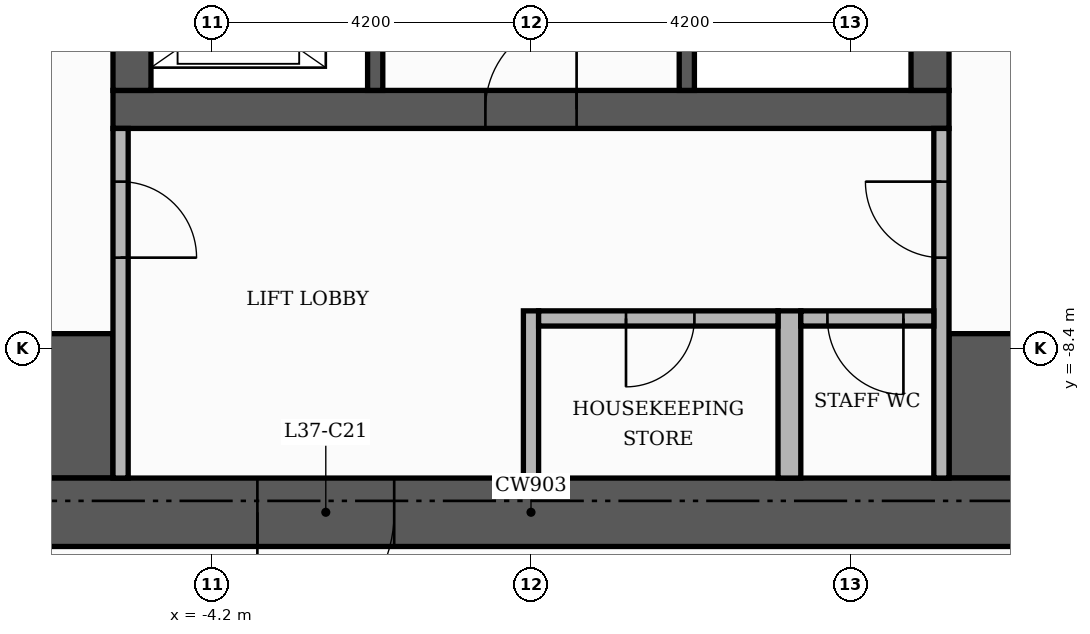
"""IFC4 building model, lengths in metres.
Left out: names, types, materials, properties, quantities, classifications, styles, units other than length and angle.
Written with IfcOpenShell. Run it as: python <this file> out.ifc"""

import sys

from ifc_helpers import new_model, si_unit, direction, frame, frame_2d, origin, place, context, subcontext, project, spatial, rectangle, extrude, element, fill, save


model = new_model("IFC4")
c1 = context("Model", 3, precision=1e-05, world=origin(), true_north=direction((0.0, 1.0)))
c2 = subcontext(c1, "Body", "Model", "MODEL_VIEW")
j1 = project(units=[si_unit("LENGTHUNIT", "METRE"), si_unit("PLANEANGLEUNIT", "RADIAN")], contexts=[c1])
p1 = place(None, origin())
s1 = spatial("IfcSite", under=j1, at=p1, CompositionType="ELEMENT")
p2 = place(p1, origin())
s2 = spatial("IfcBuilding", under=s1, at=p2, CompositionType="ELEMENT")
p3 = place(p2, frame((0.0, 0.0, 157.2)))
s3 = spatial("IfcBuildingStorey", under=s2, at=p3, CompositionType="ELEMENT", Elevation=157.2)
p4 = place(p3, frame((-5.5, -5.25, 0.0), z_axis=(0.0, 0.0, 1.0), x_axis=(1.0, 0.0, 0.0)))
e1 = element("IfcWall", 1, at=p4, inside=s3, PredefinedType="SHEAR", context=c2, shape_type="SweptSolid", body=[
    extrude(rectangle(XDim=11.0, YDim=0.5, at=frame_2d((5.5, 0.0))), origin(), (0.0, 0.0, 1.0), 3.48),
])
p5 = place(p4, frame((4.9, 0.0, 0.0)))
e2 = element("IfcOpeningElement", 2, at=p5, cuts=e1, PredefinedType="OPENING", context=c2, shape_type="SweptSolid", body=[
    extrude(rectangle(XDim=1.2, YDim=2.1, at=frame_2d((0.6, 1.05))), frame((0.0, 0.26, 0.0), z_axis=(0.0, -1.0, 0.0), x_axis=(1.0, 0.0, 0.0)), (0.0, 0.0, 1.0), 0.52),
])
for number, where, z_axis, x_axis in (
    (3, (-5.25, -5.0, 0.0), (0.0, 0.0, 1.0), (0.0, 1.0, 0.0)),
    (4, (5.25, -5.0, 0.0), (0.0, 0.0, 1.0), (0.0, 1.0, 0.0)),
):
    element("IfcWall", number, at=place(p3, frame(where, z_axis=z_axis, x_axis=x_axis)), inside=s3, PredefinedType="SHEAR", context=c2, shape_type="SweptSolid", body=[
        extrude(rectangle(XDim=10.5, YDim=0.5, at=frame_2d((5.25, 0.0))), origin(), (0.0, 0.0, 1.0), 3.48),
    ])
for number, where, z_axis, x_axis in (
    (5, (-10.1, -9.15, 0.0), (0.0, 0.0, 1.0), (1.0, 0.0, 0.0)),
    (6, (5.5, -9.15, 0.0), (0.0, 0.0, 1.0), (1.0, 0.0, 0.0)),
):
    element("IfcWall", number, at=place(p3, frame(where, z_axis=z_axis, x_axis=x_axis)), inside=s3, PredefinedType="SHEAR", context=c2, shape_type="SweptSolid", body=[
        extrude(rectangle(XDim=4.6, YDim=1.9, at=frame_2d((2.3, 0.0))), origin(), (0.0, 0.0, 1.0), 3.48),
    ])
p6 = place(p3, frame((2.05, -5.0, 0.0), z_axis=(0.0, 0.0, 1.0), x_axis=(0.0, 1.0, 0.0)))
e7 = element("IfcWall", 7, at=p6, inside=s3, PredefinedType="SHEAR", context=c2, shape_type="SweptSolid", body=[
    extrude(rectangle(XDim=6.6, YDim=0.2, at=frame_2d((3.3, 0.0))), origin(), (0.0, 0.0, 1.0), 3.48),
])
p7 = place(p6, frame((5.25, 0.0, 0.0)))
e8 = element("IfcOpeningElement", 8, at=p7, cuts=e7, PredefinedType="OPENING", context=c2, shape_type="SweptSolid", body=[
    extrude(rectangle(XDim=1.0, YDim=2.1, at=frame_2d((0.5, 1.05))), frame((0.0, 0.11, 0.0), z_axis=(0.0, -1.0, 0.0), x_axis=(1.0, 0.0, 0.0)), (0.0, 0.0, 1.0), 0.22),
])
p8 = place(p3, frame((-2.05, -5.0, 0.0), z_axis=(0.0, 0.0, 1.0), x_axis=(0.0, 1.0, 0.0)))
e9 = element("IfcWall", 9, at=p8, inside=s3, PredefinedType="SHEAR", context=c2, shape_type="SweptSolid", body=[
    extrude(rectangle(XDim=3.4, YDim=0.2, at=frame_2d((1.7, 0.0))), origin(), (0.0, 0.0, 1.0), 3.48),
])
p9 = place(p8, frame((0.55, 0.0, 0.0)))
e10 = element("IfcOpeningElement", 10, at=p9, cuts=e9, PredefinedType="OPENING", context=c2, shape_type="SweptSolid", body=[
    extrude(rectangle(XDim=1.1, YDim=2.1, at=frame_2d((0.55, 1.05))), frame((0.0, 0.11, 0.0), z_axis=(0.0, -1.0, 0.0), x_axis=(1.0, 0.0, 0.0)), (0.0, 0.0, 1.0), 0.22),
])
p10 = place(p8, frame((2.45, 0.0, 0.0)))
e11 = element("IfcOpeningElement", 11, at=p10, cuts=e9, PredefinedType="OPENING", context=c2, shape_type="SweptSolid", body=[
    extrude(rectangle(XDim=0.8, YDim=2.1, at=frame_2d((0.4, 1.05))), frame((0.0, 0.11, 0.0), z_axis=(0.0, -1.0, 0.0), x_axis=(1.0, 0.0, 0.0)), (0.0, 0.0, 1.0), 0.22),
])
p11 = place(p3, frame((-11.0, -10.55, 0.0), z_axis=(0.0, 0.0, 1.0), x_axis=(1.0, 0.0, 0.0)))
e12 = element("IfcWall", 12, at=p11, inside=s3, PredefinedType="SHEAR", context=c2, shape_type="SweptSolid", body=[
    extrude(rectangle(XDim=22.0, YDim=0.9, at=frame_2d((11.0, 0.0))), origin(), (0.0, 0.0, 1.0), 3.48),
])
p12 = place(p11, frame((7.4, 0.0, 0.0)))
e13 = element("IfcOpeningElement", 13, at=p12, cuts=e12, PredefinedType="OPENING", context=c2, shape_type="SweptSolid", body=[
    extrude(rectangle(XDim=1.8, YDim=2.2, at=frame_2d((0.9, 1.1))), frame((0.0, 0.46, 0.0), z_axis=(0.0, -1.0, 0.0), x_axis=(1.0, 0.0, 0.0)), (0.0, 0.0, 1.0), 0.92),
])
p13 = place(p3, frame((-5.4, -10.1, 0.0), z_axis=(0.0, 0.0, 1.0), x_axis=(0.0, 1.0, 0.0)))
e14 = element("IfcWall", 14, at=p13, inside=s3, PredefinedType="PARTITIONING", context=c2, shape_type="SweptSolid", body=[
    extrude(rectangle(XDim=4.6, YDim=0.2, at=frame_2d((2.3, 0.0))), origin(), (0.0, 0.0, 1.0), 3.48),
])
p14 = place(p13, frame((2.9, 0.0, 0.0)))
e15 = element("IfcOpeningElement", 15, at=p14, cuts=e14, PredefinedType="OPENING", context=c2, shape_type="SweptSolid", body=[
    extrude(rectangle(XDim=1.0, YDim=2.1, at=frame_2d((0.5, 1.05))), frame((0.0, 0.11, 0.0), z_axis=(0.0, -1.0, 0.0), x_axis=(1.0, 0.0, 0.0)), (0.0, 0.0, 1.0), 0.22),
])
p15 = place(p3, frame((0.0, -10.1, 0.0), z_axis=(0.0, 0.0, 1.0), x_axis=(0.0, 1.0, 0.0)))
e16 = element("IfcWall", 16, at=p15, inside=s3, PredefinedType="PARTITIONING", context=c2, shape_type="SweptSolid", body=[
    extrude(rectangle(XDim=2.2, YDim=0.2, at=frame_2d((1.1, 0.0))), origin(), (0.0, 0.0, 1.0), 3.48),
])
p16 = place(p3, frame((3.4, -10.1, 0.0), z_axis=(0.0, 0.0, 1.0), x_axis=(0.0, 1.0, 0.0)))
e17 = element("IfcWall", 17, at=p16, inside=s3, PredefinedType="PARTITIONING", context=c2, shape_type="SweptSolid", body=[
    extrude(rectangle(XDim=2.2, YDim=0.3, at=frame_2d((1.1, 0.0))), origin(), (0.0, 0.0, 1.0), 3.48),
])
p17 = place(p3, frame((5.4, -10.1, 0.0), z_axis=(0.0, 0.0, 1.0), x_axis=(0.0, 1.0, 0.0)))
e18 = element("IfcWall", 18, at=p17, inside=s3, PredefinedType="PARTITIONING", context=c2, shape_type="SweptSolid", body=[
    extrude(rectangle(XDim=4.6, YDim=0.2, at=frame_2d((2.3, 0.0))), origin(), (0.0, 0.0, 1.0), 3.48),
])
p18 = place(p17, frame((2.9, 0.0, 0.0)))
e19 = element("IfcOpeningElement", 19, at=p18, cuts=e18, PredefinedType="OPENING", context=c2, shape_type="SweptSolid", body=[
    extrude(rectangle(XDim=1.0, YDim=2.1, at=frame_2d((0.5, 1.05))), frame((0.0, 0.11, 0.0), z_axis=(0.0, -1.0, 0.0), x_axis=(1.0, 0.0, 0.0)), (0.0, 0.0, 1.0), 0.22),
])
p19 = place(p3, frame((0.1, -8.0, 0.0), z_axis=(0.0, 0.0, 1.0), x_axis=(1.0, 0.0, 0.0)))
e20 = element("IfcWall", 20, at=p19, inside=s3, PredefinedType="PARTITIONING", context=c2, shape_type="SweptSolid", body=[
    extrude(rectangle(XDim=3.15, YDim=0.2, at=frame_2d((1.575, 0.0))), origin(), (0.0, 0.0, 1.0), 3.48),
])
p20 = place(p19, frame((1.15, 0.0, 0.0)))
e21 = element("IfcOpeningElement", 21, at=p20, cuts=e20, PredefinedType="OPENING", context=c2, shape_type="SweptSolid", body=[
    extrude(rectangle(XDim=0.9, YDim=2.1, at=frame_2d((0.45, 1.05))), frame((0.0, 0.11, 0.0), z_axis=(0.0, -1.0, 0.0), x_axis=(1.0, 0.0, 0.0)), (0.0, 0.0, 1.0), 0.22),
])
p21 = place(p3, frame((3.55, -8.0, 0.0), z_axis=(0.0, 0.0, 1.0), x_axis=(1.0, 0.0, 0.0)))
e22 = element("IfcWall", 22, at=p21, inside=s3, PredefinedType="PARTITIONING", context=c2, shape_type="SweptSolid", body=[
    extrude(rectangle(XDim=1.75, YDim=0.2, at=frame_2d((0.875, 0.0))), origin(), (0.0, 0.0, 1.0), 3.48),
])
p22 = place(p21, frame((0.35, 0.0, 0.0)))
e23 = element("IfcOpeningElement", 23, at=p22, cuts=e22, PredefinedType="OPENING", context=c2, shape_type="SweptSolid", body=[
    extrude(rectangle(XDim=1.0, YDim=2.1, at=frame_2d((0.5, 1.05))), frame((0.0, 0.11, 0.0), z_axis=(0.0, -1.0, 0.0), x_axis=(1.0, 0.0, 0.0)), (0.0, 0.0, 1.0), 0.22),
])
p23 = place(p5, origin())
e24 = element("IfcDoor", 24, at=p23, inside=s3, OperationType="SINGLE_SWING_RIGHT", PredefinedType="DOOR", context=c2, shape_type="SweptSolid", body=[
    extrude(rectangle(XDim=1.2, YDim=2.1, at=frame_2d((0.6, 1.05))), frame((0.0, 0.025, 0.0), z_axis=(0.0, -1.0, 0.0), x_axis=(1.0, 0.0, 0.0)), (0.0, 0.0, 1.0), 0.05),
])
fill(e2, e24)
p24 = place(p14, frame((1.0, 0.0, 0.0), z_axis=(0.0, 0.0, 1.0), x_axis=(-1.0, 0.0, 0.0)))
e25 = element("IfcDoor", 25, at=p24, inside=s3, OperationType="SINGLE_SWING_LEFT", PredefinedType="DOOR", context=c2, shape_type="SweptSolid", body=[
    extrude(rectangle(XDim=1.0, YDim=2.1, at=frame_2d((0.5, 1.05))), frame((0.0, 0.025, 0.0), z_axis=(0.0, -1.0, 0.0), x_axis=(1.0, 0.0, 0.0)), (0.0, 0.0, 1.0), 0.05),
])
fill(e15, e25)
p25 = place(p18, origin())
e26 = element("IfcDoor", 26, at=p25, inside=s3, OperationType="SINGLE_SWING_RIGHT", PredefinedType="DOOR", context=c2, shape_type="SweptSolid", body=[
    extrude(rectangle(XDim=1.0, YDim=2.1, at=frame_2d((0.5, 1.05))), frame((0.0, 0.025, 0.0), z_axis=(0.0, -1.0, 0.0), x_axis=(1.0, 0.0, 0.0)), (0.0, 0.0, 1.0), 0.05),
])
fill(e19, e26)
p26 = place(p12, frame((1.8, 0.0, 0.0), z_axis=(0.0, 0.0, 1.0), x_axis=(-1.0, 0.0, 0.0)))
e27 = element("IfcDoor", 27, at=p26, inside=s3, OperationType="DOUBLE_DOOR_SINGLE_SWING", PredefinedType="DOOR", context=c2, shape_type="SweptSolid", body=[
    extrude(rectangle(XDim=1.8, YDim=2.2, at=frame_2d((0.9, 1.1))), frame((0.0, 0.025, 0.0), z_axis=(0.0, -1.0, 0.0), x_axis=(1.0, 0.0, 0.0)), (0.0, 0.0, 1.0), 0.05),
])
fill(e13, e27)
p27 = place(p20, frame((0.9, 0.0, 0.0), z_axis=(0.0, 0.0, 1.0), x_axis=(-1.0, 0.0, 0.0)))
e28 = element("IfcDoor", 28, at=p27, inside=s3, OperationType="SINGLE_SWING_LEFT", PredefinedType="DOOR", context=c2, shape_type="SweptSolid", body=[
    extrude(rectangle(XDim=0.9, YDim=2.1, at=frame_2d((0.45, 1.05))), frame((0.0, 0.025, 0.0), z_axis=(0.0, -1.0, 0.0), x_axis=(1.0, 0.0, 0.0)), (0.0, 0.0, 1.0), 0.05),
])
fill(e21, e28)
p28 = place(p22, frame((1.0, 0.0, 0.0), z_axis=(0.0, 0.0, 1.0), x_axis=(-1.0, 0.0, 0.0)))
e29 = element("IfcDoor", 29, at=p28, inside=s3, OperationType="SINGLE_SWING_RIGHT", PredefinedType="DOOR", context=c2, shape_type="SweptSolid", body=[
    extrude(rectangle(XDim=1.0, YDim=2.1, at=frame_2d((0.5, 1.05))), frame((0.0, 0.025, 0.0), z_axis=(0.0, -1.0, 0.0), x_axis=(1.0, 0.0, 0.0)), (0.0, 0.0, 1.0), 0.05),
])
fill(e23, e29)
save(model, sys.argv[1])
